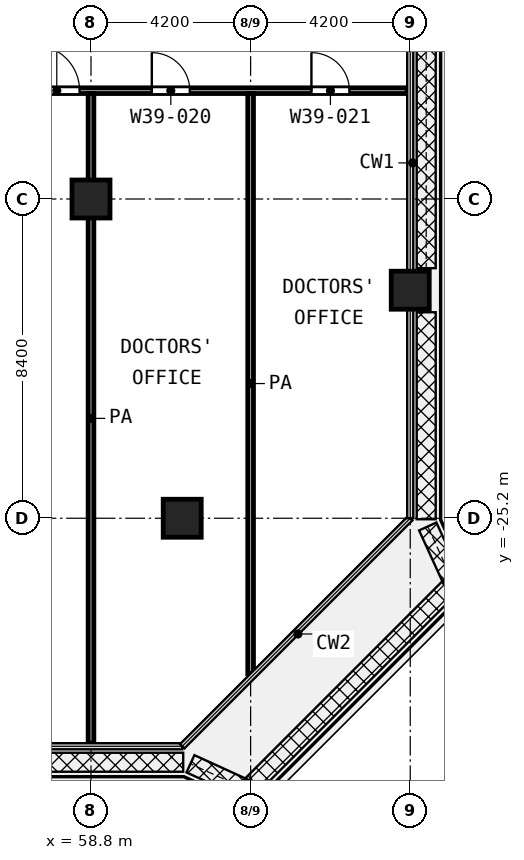
"""IFC4 building model, lengths in metres.
Left out: names, types, materials, properties, quantities, classifications, styles, units other than length and angle.
Written with IfcOpenShell. Run it as: python <this file> out.ifc"""

import sys

from ifc_helpers import new_model, si_unit, direction, frame, frame_2d, origin, origin_2d, place, context, subcontext, project, spatial, rectangle, extrude, element, fill, save


model = new_model("IFC4")
c1 = context("Model", 3, precision=1e-05, world=origin(), true_north=direction((0.0, 1.0)))
c2 = subcontext(c1, "Body", "Model", "MODEL_VIEW")
j1 = project(units=[si_unit("LENGTHUNIT", "METRE"), si_unit("PLANEANGLEUNIT", "RADIAN")], contexts=[c1])
p1 = place(None, origin())
s1 = spatial("IfcSite", under=j1, at=p1, CompositionType="ELEMENT")
p2 = place(p1, origin())
s2 = spatial("IfcBuilding", under=s1, at=p2, CompositionType="ELEMENT")
p3 = place(p2, frame((0.0, 0.0, 192.0)))
s3 = spatial("IfcBuildingStorey", under=s2, at=p3, CompositionType="ELEMENT", Elevation=192.0)
for number, where, z_axis, x_axis in (
    (1, (58.8, -16.8, 0.0), (0.0, 0.0, 1.0), (1.0, 0.0, 0.0)),
    (2, (67.2, -19.2, 0.0), (0.0, 0.0, 1.0), (1.0, 0.0, 0.0)),
    (3, (61.2, -25.2, 0.0), (0.0, 0.0, 1.0), (1.0, 0.0, 0.0)),
):
    element("IfcColumn", number, at=place(p3, frame(where, z_axis=z_axis, x_axis=x_axis)), inside=s3, PredefinedType="COLUMN", context=c2, shape_type="SweptSolid", body=[
        extrude(rectangle(XDim=1.0, YDim=1.0, at=origin_2d()), origin(), (0.0, 0.0, 1.0), 4.2),
    ])
p4 = place(p3, frame((29.4, -13.95, 0.0), z_axis=(0.0, 0.0, 1.0), x_axis=(1.0, 0.0, 0.0)))
e4 = element("IfcWall", 4, at=p4, inside=s3, PredefinedType="PARTITIONING", context=c2, shape_type="SweptSolid", body=[
    extrude(rectangle(XDim=37.72, YDim=0.15, at=frame_2d((18.86, 0.0))), origin(), (0.0, 0.0, 1.0), 3.6),
])
p5 = place(p4, frame((1.6, 0.0, 0.0)))
e5 = element("IfcOpeningElement", 5, at=p5, cuts=e4, PredefinedType="OPENING", context=c2, shape_type="SweptSolid", body=[
    extrude(rectangle(XDim=1.0, YDim=2.1, at=frame_2d((0.5, 1.05))), frame((0.0, 0.085, 0.0), z_axis=(0.0, -1.0, 0.0), x_axis=(1.0, 0.0, 0.0)), (0.0, 0.0, 1.0), 0.17),
])
p6 = place(p4, frame((5.55, 0.0, 0.0)))
e6 = element("IfcOpeningElement", 6, at=p6, cuts=e4, PredefinedType="OPENING", context=c2, shape_type="SweptSolid", body=[
    extrude(rectangle(XDim=1.2, YDim=2.1, at=frame_2d((0.6, 1.05))), frame((0.0, 0.085, 0.0), z_axis=(0.0, -1.0, 0.0), x_axis=(1.0, 0.0, 0.0)), (0.0, 0.0, 1.0), 0.17),
])
p7 = place(p4, frame((11.2, 0.0, 0.0)))
e7 = element("IfcOpeningElement", 7, at=p7, cuts=e4, PredefinedType="OPENING", context=c2, shape_type="SweptSolid", body=[
    extrude(rectangle(XDim=1.2, YDim=2.1, at=frame_2d((0.6, 1.05))), frame((0.0, 0.085, 0.0), z_axis=(0.0, -1.0, 0.0), x_axis=(1.0, 0.0, 0.0)), (0.0, 0.0, 1.0), 0.17),
])
p8 = place(p4, frame((14.35, 0.0, 0.0)))
e8 = element("IfcOpeningElement", 8, at=p8, cuts=e4, PredefinedType="OPENING", context=c2, shape_type="SweptSolid", body=[
    extrude(rectangle(XDim=1.0, YDim=2.1, at=frame_2d((0.5, 1.05))), frame((0.0, 0.085, 0.0), z_axis=(0.0, -1.0, 0.0), x_axis=(1.0, 0.0, 0.0)), (0.0, 0.0, 1.0), 0.17),
])
p9 = place(p4, frame((19.6, 0.0, 0.0)))
e9 = element("IfcOpeningElement", 9, at=p9, cuts=e4, PredefinedType="OPENING", context=c2, shape_type="SweptSolid", body=[
    extrude(rectangle(XDim=1.2, YDim=2.1, at=frame_2d((0.6, 1.05))), frame((0.0, 0.085, 0.0), z_axis=(0.0, -1.0, 0.0), x_axis=(1.0, 0.0, 0.0)), (0.0, 0.0, 1.0), 0.17),
])
p10 = place(p4, frame((21.2, 0.0, 0.0)))
e10 = element("IfcOpeningElement", 10, at=p10, cuts=e4, PredefinedType="OPENING", context=c2, shape_type="SweptSolid", body=[
    extrude(rectangle(XDim=1.1, YDim=2.1, at=frame_2d((0.55, 1.05))), frame((0.0, 0.085, 0.0), z_axis=(0.0, -1.0, 0.0), x_axis=(1.0, 0.0, 0.0)), (0.0, 0.0, 1.0), 0.17),
])
p11 = place(p4, frame((27.9, 0.0, 0.0)))
e11 = element("IfcOpeningElement", 11, at=p11, cuts=e4, PredefinedType="OPENING", context=c2, shape_type="SweptSolid", body=[
    extrude(rectangle(XDim=1.2, YDim=2.1, at=frame_2d((0.6, 1.05))), frame((0.0, 0.085, 0.0), z_axis=(0.0, -1.0, 0.0), x_axis=(1.0, 0.0, 0.0)), (0.0, 0.0, 1.0), 0.17),
])
p12 = place(p4, frame((31.0, 0.0, 0.0)))
e12 = element("IfcOpeningElement", 12, at=p12, cuts=e4, PredefinedType="OPENING", context=c2, shape_type="SweptSolid", body=[
    extrude(rectangle(XDim=1.0, YDim=2.1, at=frame_2d((0.5, 1.05))), frame((0.0, 0.085, 0.0), z_axis=(0.0, -1.0, 0.0), x_axis=(1.0, 0.0, 0.0)), (0.0, 0.0, 1.0), 0.17),
])
p13 = place(p4, frame((35.2, 0.0, 0.0)))
e13 = element("IfcOpeningElement", 13, at=p13, cuts=e4, PredefinedType="OPENING", context=c2, shape_type="SweptSolid", body=[
    extrude(rectangle(XDim=1.0, YDim=2.1, at=frame_2d((0.5, 1.05))), frame((0.0, 0.085, 0.0), z_axis=(0.0, -1.0, 0.0), x_axis=(1.0, 0.0, 0.0)), (0.0, 0.0, 1.0), 0.17),
])
p14 = place(p3, frame((58.8, -31.12, 0.0), z_axis=(0.0, 0.0, 1.0), x_axis=(0.0, 1.0, 0.0)))
e14 = element("IfcWall", 14, at=p14, inside=s3, PredefinedType="PARTITIONING", context=c2, shape_type="SweptSolid", body=[
    extrude(rectangle(XDim=17.095, YDim=0.15, at=frame_2d((8.548, 0.0))), origin(), (0.0, 0.0, 1.0), 3.6),
])
p15 = place(p3, frame((63.0, -29.287, 0.0), z_axis=(0.0, 0.0, 1.0), x_axis=(0.0, 1.0, 0.0)))
e15 = element("IfcWall", 15, at=p15, inside=s3, PredefinedType="PARTITIONING", context=c2, shape_type="SweptSolid", body=[
    extrude(rectangle(XDim=15.262, YDim=0.15, at=frame_2d((7.631, 0.0))), origin(), (0.0, 0.0, 1.0), 3.6),
])
p16 = place(p11, origin())
e16 = element("IfcDoor", 16, at=p16, inside=s3, OperationType="SINGLE_SWING_LEFT", PredefinedType="DOOR", context=c2, shape_type="SweptSolid", body=[
    extrude(rectangle(XDim=1.2, YDim=2.1, at=frame_2d((0.6, 1.05))), frame((0.0, 0.025, 0.0), z_axis=(0.0, -1.0, 0.0), x_axis=(1.0, 0.0, 0.0)), (0.0, 0.0, 1.0), 0.05),
])
fill(e11, e16)
p17 = place(p12, origin())
e17 = element("IfcDoor", 17, at=p17, inside=s3, OperationType="SINGLE_SWING_LEFT", PredefinedType="DOOR", context=c2, shape_type="SweptSolid", body=[
    extrude(rectangle(XDim=1.0, YDim=2.1, at=frame_2d((0.5, 1.05))), frame((0.0, 0.025, 0.0), z_axis=(0.0, -1.0, 0.0), x_axis=(1.0, 0.0, 0.0)), (0.0, 0.0, 1.0), 0.05),
])
fill(e12, e17)
p18 = place(p13, origin())
e18 = element("IfcDoor", 18, at=p18, inside=s3, OperationType="SINGLE_SWING_LEFT", PredefinedType="DOOR", context=c2, shape_type="SweptSolid", body=[
    extrude(rectangle(XDim=1.0, YDim=2.1, at=frame_2d((0.5, 1.05))), frame((0.0, 0.025, 0.0), z_axis=(0.0, -1.0, 0.0), x_axis=(1.0, 0.0, 0.0)), (0.0, 0.0, 1.0), 0.05),
])
fill(e13, e18)
save(model, sys.argv[1])
